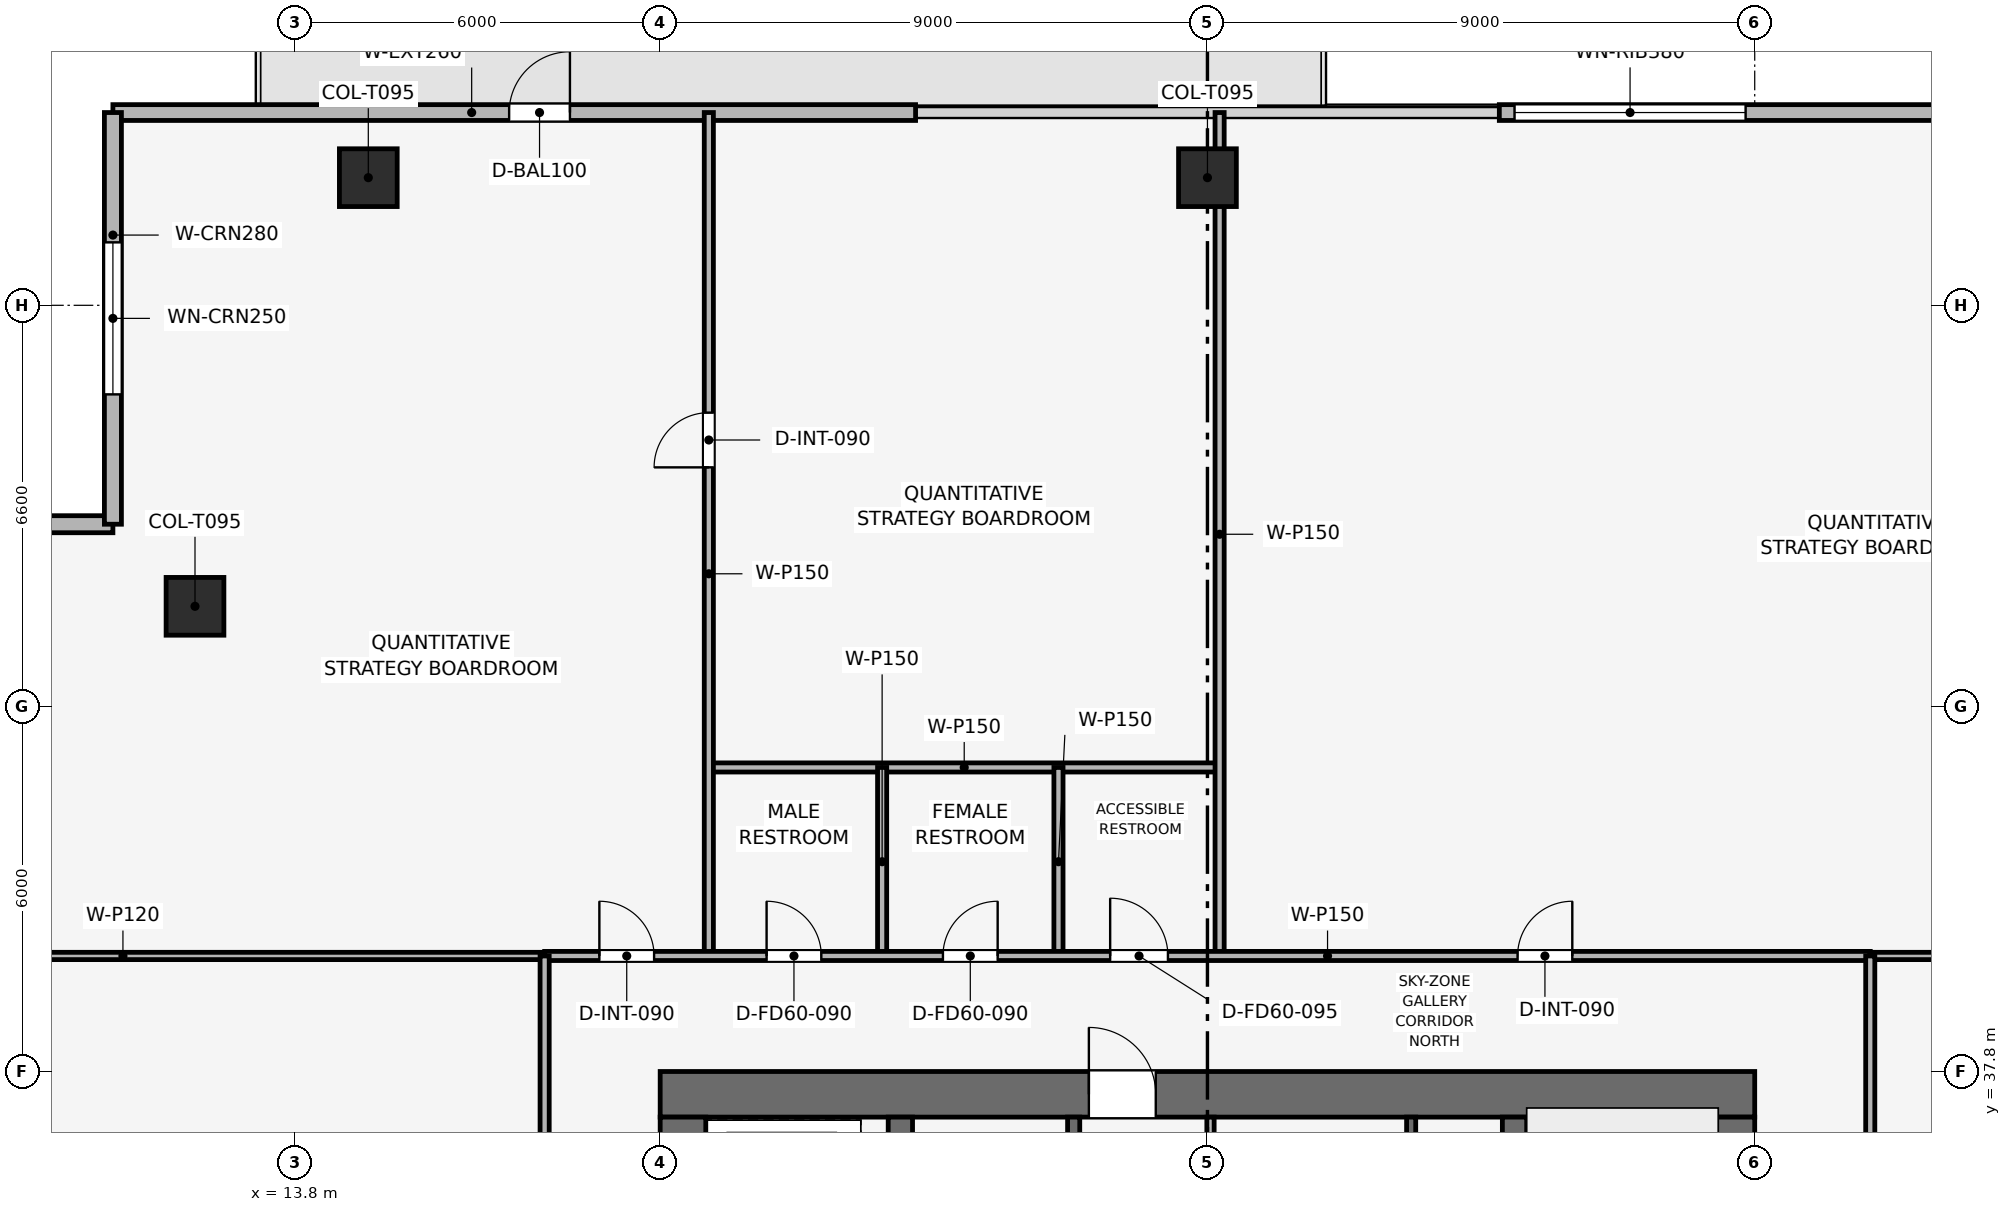
"""IFC4 building model, lengths in metres.
Left out: names, types, materials, properties, quantities, classifications, styles, units other than length and angle.
Written with IfcOpenShell. Run it as: python <this file> out.ifc"""

import sys

from ifc_helpers import new_model, si_unit, direction, frame, frame_2d, origin, origin_2d, place, context, subcontext, project, spatial, rectangle, extrude, element, fill, save


model = new_model("IFC4")
c1 = context("Model", 3, precision=1e-05, world=origin(), true_north=direction((0.0, 1.0)))
c2 = subcontext(c1, "Body", "Model", "MODEL_VIEW")
j1 = project(units=[si_unit("LENGTHUNIT", "METRE"), si_unit("PLANEANGLEUNIT", "RADIAN")], contexts=[c1])
p1 = place(None, origin())
s1 = spatial("IfcSite", under=j1, at=p1, CompositionType="ELEMENT")
p2 = place(p1, origin())
s2 = spatial("IfcBuilding", under=s1, at=p2, CompositionType="ELEMENT")
p3 = place(p2, frame((0.0, 0.0, 280.35)))
s3 = spatial("IfcBuildingStorey", under=s2, at=p3, CompositionType="ELEMENT", Elevation=280.35)
p4 = place(p3, frame((19.8, 37.425, 0.0), z_axis=(0.0, 0.0, 1.0), x_axis=(1.0, 0.0, 0.0)))
e1 = element("IfcWall", 1, at=p4, inside=s3, PredefinedType="SHEAR", context=c2, shape_type="SweptSolid", body=[
    extrude(rectangle(XDim=18.0, YDim=0.75, at=frame_2d((9.0, 0.0))), origin(), (0.0, 0.0, 1.0), 3.75),
])
p5 = place(p4, frame((7.05, 0.0, 0.0)))
e2 = element("IfcOpeningElement", 2, at=p5, cuts=e1, PredefinedType="OPENING", context=c2, shape_type="SweptSolid", body=[
    extrude(rectangle(XDim=1.1, YDim=2.15, at=frame_2d((0.55, 1.075))), frame((0.0, 0.385, 0.0), z_axis=(0.0, -1.0, 0.0), x_axis=(1.0, 0.0, 0.0)), (0.0, 0.0, 1.0), 0.77),
])
p6 = place(p3, frame((20.175, 20.55, 0.0), z_axis=(0.0, 0.0, 1.0), x_axis=(0.0, 1.0, 0.0)))
e3 = element("IfcWall", 3, at=p6, inside=s3, PredefinedType="SHEAR", context=c2, shape_type="SweptSolid", body=[
    extrude(rectangle(XDim=16.5, YDim=0.75, at=frame_2d((8.25, 0.0))), origin(), (0.0, 0.0, 1.0), 3.75),
])
p7 = place(p6, frame((10.25, 0.0, 0.0)))
e4 = element("IfcOpeningElement", 4, at=p7, cuts=e3, PredefinedType="OPENING", context=c2, shape_type="SweptSolid", body=[
    extrude(rectangle(XDim=1.1, YDim=2.15, at=frame_2d((0.55, 1.075))), frame((0.0, 0.385, 0.0), z_axis=(0.0, -1.0, 0.0), x_axis=(1.0, 0.0, 0.0)), (0.0, 0.0, 1.0), 0.77),
])
p8 = place(p3, frame((37.425, 20.55, 0.0), z_axis=(0.0, 0.0, 1.0), x_axis=(0.0, 1.0, 0.0)))
e5 = element("IfcWall", 5, at=p8, inside=s3, PredefinedType="SHEAR", context=c2, shape_type="SweptSolid", body=[
    extrude(rectangle(XDim=16.5, YDim=0.75, at=frame_2d((8.25, 0.0))), origin(), (0.0, 0.0, 1.0), 3.75),
])
p9 = place(p8, frame((4.75, 0.0, 0.0)))
e6 = element("IfcOpeningElement", 6, at=p9, cuts=e5, PredefinedType="OPENING", context=c2, shape_type="SweptSolid", body=[
    extrude(rectangle(XDim=1.1, YDim=2.15, at=frame_2d((0.55, 1.075))), frame((0.0, 0.385, 0.0), z_axis=(0.0, -1.0, 0.0), x_axis=(1.0, 0.0, 0.0)), (0.0, 0.0, 1.0), 0.77),
])
for number, where, z_axis, x_axis in (
    (7, (23.75, 20.55, 0.0), (0.0, 0.0, 1.0), (0.0, 1.0, 0.0)),
    (8, (33.85, 20.55, 0.0), (0.0, 0.0, 1.0), (0.0, 1.0, 0.0)),
):
    element("IfcWall", number, at=place(p3, frame(where, z_axis=z_axis, x_axis=x_axis)), inside=s3, PredefinedType="SHEAR", context=c2, shape_type="SweptSolid", body=[
        extrude(rectangle(XDim=16.5, YDim=0.4, at=frame_2d((8.25, 0.0))), origin(), (0.0, 0.0, 1.0), 3.75),
    ])
for number, where, z_axis, x_axis in (
    (9, (28.8, 52.499, 0.003), (0.0, -0.233, 0.972), (1.0, 0.0, 0.0)),
    (10, (15.0, 52.499, 0.003), (0.0, -0.233, 0.972), (1.0, 0.0, 0.0)),
):
    element("IfcColumn", number, at=place(p3, frame(where, z_axis=z_axis, x_axis=x_axis)), inside=s3, PredefinedType="COLUMN", context=c2, shape_type="SweptSolid", body=[
        extrude(rectangle(XDim=0.95, YDim=0.95, at=origin_2d()), origin(), (0.0, 0.0, 1.0), 3.48),
    ])
p10 = place(p3, frame((12.15, 45.45, 0.003), z_axis=(0.156204794595, -0.156204794595, 0.975294890939), x_axis=(0.707106781187, 0.707106781187, 0.0)))
e11 = element("IfcColumn", 11, at=p10, inside=s3, PredefinedType="COLUMN", context=c2, shape_type="SweptSolid", body=[
    extrude(rectangle(XDim=0.95, YDim=0.95, at=origin_2d()), origin(), (0.0, 0.0, 1.0), 3.47),
])
p11 = place(p3, frame((10.8, 53.57, 0.0), z_axis=(0.0, 0.0, 1.0), x_axis=(1.0, 0.0, 0.0)))
e12 = element("IfcWall", 12, at=p11, inside=s3, PredefinedType="SOLIDWALL", context=c2, shape_type="SweptSolid", body=[
    extrude(rectangle(XDim=13.2, YDim=0.26, at=frame_2d((6.6, 0.0))), origin(), (0.0, 0.0, 1.0), 3.39),
])
p12 = place(p11, frame((6.516, 0.0, 0.0)))
e13 = element("IfcOpeningElement", 13, at=p12, cuts=e12, PredefinedType="OPENING", context=c2, shape_type="SweptSolid", body=[
    extrude(rectangle(XDim=1.0, YDim=2.2, at=frame_2d((0.5, 1.1))), frame((0.0, 0.14, 0.0), z_axis=(0.0, -1.0, 0.0), x_axis=(1.0, 0.0, 0.0)), (0.0, 0.0, 1.0), 0.28),
])
p13 = place(p3, frame((33.6, 53.57, 0.0), z_axis=(0.0, 0.0, 1.0), x_axis=(1.0, 0.0, 0.0)))
e14 = element("IfcWall", 14, at=p13, inside=s3, PredefinedType="SOLIDWALL", context=c2, shape_type="SweptSolid", body=[
    extrude(rectangle(XDim=13.2, YDim=0.26, at=frame_2d((6.6, 0.0))), origin(), (0.0, 0.0, 1.0), 3.39),
])
p14 = place(p13, frame((0.25, 0.0, 0.72)))
e15 = element("IfcOpeningElement", 15, at=p14, cuts=e14, PredefinedType="OPENING", context=c2, shape_type="SweptSolid", body=[
    extrude(rectangle(XDim=3.8, YDim=1.9, at=frame_2d((1.9, 0.95))), frame((0.0, 0.14, 0.0), z_axis=(0.0, -1.0, 0.0), x_axis=(1.0, 0.0, 0.0)), (0.0, 0.0, 1.0), 0.28),
])
p15 = place(p3, frame((4.03, 46.8, 0.0), z_axis=(0.0, 0.0, 1.0), x_axis=(1.0, 0.0, 0.0)))
e16 = element("IfcWall", 16, at=p15, inside=s3, PredefinedType="SOLIDWALL", context=c2, shape_type="SweptSolid", body=[
    extrude(rectangle(XDim=6.77, YDim=0.28, at=frame_2d((3.385, 0.0))), origin(), (0.0, 0.0, 1.0), 3.39),
])
p16 = place(p15, frame((2.135, 0.0, 0.72)))
e17 = element("IfcOpeningElement", 17, at=p16, cuts=e16, PredefinedType="OPENING", context=c2, shape_type="SweptSolid", body=[
    extrude(rectangle(XDim=2.5, YDim=1.9, at=frame_2d((1.25, 0.95))), frame((0.0, 0.15, 0.0), z_axis=(0.0, -1.0, 0.0), x_axis=(1.0, 0.0, 0.0)), (0.0, 0.0, 1.0), 0.3),
])
p17 = place(p3, frame((10.8, 46.8, 0.0), z_axis=(0.0, 0.0, 1.0), x_axis=(0.0, 1.0, 0.0)))
e18 = element("IfcWall", 18, at=p17, inside=s3, PredefinedType="SOLIDWALL", context=c2, shape_type="SweptSolid", body=[
    extrude(rectangle(XDim=6.77, YDim=0.28, at=frame_2d((3.385, 0.0))), origin(), (0.0, 0.0, 1.0), 3.39),
])
p18 = place(p17, frame((2.135, 0.0, 0.72)))
e19 = element("IfcOpeningElement", 19, at=p18, cuts=e18, PredefinedType="OPENING", context=c2, shape_type="SweptSolid", body=[
    extrude(rectangle(XDim=2.5, YDim=1.9, at=frame_2d((1.25, 0.95))), frame((0.0, 0.15, 0.0), z_axis=(0.0, -1.0, 0.0), x_axis=(1.0, 0.0, 0.0)), (0.0, 0.0, 1.0), 0.3),
])
p19 = place(p3, frame((32.15, 34.0, 0.0), z_axis=(0.0, 0.0, 1.0), x_axis=(0.0, 1.0, 0.0)))
e20 = element("IfcWall", 20, at=p19, inside=s3, PredefinedType="SHEAR", context=c2, shape_type="SweptSolid", body=[
    extrude(rectangle(XDim=3.05, YDim=0.15, at=frame_2d((1.525, 0.0))), origin(), (0.0, 0.0, 1.0), 3.39),
])
p20 = place(p3, frame((26.6, 34.0, 0.0), z_axis=(0.0, 0.0, 1.0), x_axis=(0.0, 1.0, 0.0)))
e21 = element("IfcWall", 21, at=p20, inside=s3, PredefinedType="SHEAR", context=c2, shape_type="SweptSolid", body=[
    extrude(rectangle(XDim=3.05, YDim=0.2, at=frame_2d((1.525, 0.0))), origin(), (0.0, 0.0, 1.0), 3.39),
])
p21 = place(p20, frame((0.75, 0.0, 0.0)))
e22 = element("IfcOpeningElement", 22, at=p21, cuts=e21, PredefinedType="OPENING", context=c2, shape_type="SweptSolid", body=[
    extrude(rectangle(XDim=1.1, YDim=2.15, at=frame_2d((0.55, 1.075))), frame((0.0, 0.11, 0.0), z_axis=(0.0, -1.0, 0.0), x_axis=(1.0, 0.0, 0.0)), (0.0, 0.0, 1.0), 0.22),
])
p22 = place(p3, frame((28.85, 33.925, 0.0), z_axis=(0.0, 0.0, 1.0), x_axis=(0.0, 1.0, 0.0)))
e23 = element("IfcWall", 23, at=p22, inside=s3, PredefinedType="PARTITIONING", context=c2, shape_type="SweptSolid", body=[
    extrude(rectangle(XDim=3.125, YDim=0.12, at=frame_2d((1.562, 0.0))), origin(), (0.0, 0.0, 1.0), 3.39),
])
p23 = place(p22, frame((0.25, 0.0, 0.0)))
e24 = element("IfcOpeningElement", 24, at=p23, cuts=e23, PredefinedType="OPENING", context=c2, shape_type="SweptSolid", body=[
    extrude(rectangle(XDim=0.85, YDim=2.1, at=frame_2d((0.425, 1.05))), frame((0.0, 0.07, 0.0), z_axis=(0.0, -1.0, 0.0), x_axis=(1.0, 0.0, 0.0)), (0.0, 0.0, 1.0), 0.14),
])
p24 = place(p22, frame((1.72, 0.0, 0.0)))
e25 = element("IfcOpeningElement", 25, at=p24, cuts=e23, PredefinedType="OPENING", context=c2, shape_type="SweptSolid", body=[
    extrude(rectangle(XDim=0.85, YDim=2.1, at=frame_2d((0.425, 1.05))), frame((0.0, 0.07, 0.0), z_axis=(0.0, -1.0, 0.0), x_axis=(1.0, 0.0, 0.0)), (0.0, 0.0, 1.0), 0.14),
])
p25 = place(p3, frame((20.6, 42.8, 0.0), z_axis=(0.0, 0.0, 1.0), x_axis=(1.0, 0.0, 0.0)))
e26 = element("IfcWall", 26, at=p25, inside=s3, PredefinedType="PARTITIONING", context=c2, shape_type="SweptSolid", body=[
    extrude(rectangle(XDim=8.4, YDim=0.15, at=frame_2d((4.2, 0.0))), origin(), (0.0, 0.0, 1.0), 2.975),
])
p26 = place(p3, frame((20.6, 39.7, 0.0), z_axis=(0.0, 0.0, 1.0), x_axis=(0.0, 1.0, 0.0)))
e27 = element("IfcWall", 27, at=p26, inside=s3, PredefinedType="PARTITIONING", context=c2, shape_type="SweptSolid", body=[
    extrude(rectangle(XDim=13.87, YDim=0.15, at=frame_2d((6.935, 0.0))), origin(), (0.0, 0.0, 1.0), 2.975),
])
p27 = place(p26, frame((8.035, 0.0, 0.0)))
e28 = element("IfcOpeningElement", 28, at=p27, cuts=e27, PredefinedType="OPENING", context=c2, shape_type="SweptSolid", body=[
    extrude(rectangle(XDim=0.9, YDim=2.1, at=frame_2d((0.45, 1.05))), frame((0.0, 0.085, 0.0), z_axis=(0.0, -1.0, 0.0), x_axis=(1.0, 0.0, 0.0)), (0.0, 0.0, 1.0), 0.17),
])
p28 = place(p3, frame((29.0, 39.7, 0.0), z_axis=(0.0, 0.0, 1.0), x_axis=(0.0, 1.0, 0.0)))
e29 = element("IfcWall", 29, at=p28, inside=s3, PredefinedType="PARTITIONING", context=c2, shape_type="SweptSolid", body=[
    extrude(rectangle(XDim=13.87, YDim=0.15, at=frame_2d((6.935, 0.0))), origin(), (0.0, 0.0, 1.0), 2.975),
])
for number, where, z_axis, x_axis in (
    (30, (23.45, 39.7, 0.0), (0.0, 0.0, 1.0), (0.0, 1.0, 0.0)),
    (31, (26.35, 39.7, 0.0), (0.0, 0.0, 1.0), (0.0, 1.0, 0.0)),
):
    element("IfcWall", number, at=place(p3, frame(where, z_axis=z_axis, x_axis=x_axis)), inside=s3, PredefinedType="PARTITIONING", context=c2, shape_type="SweptSolid", body=[
        extrude(rectangle(XDim=3.1, YDim=0.15, at=frame_2d((1.55, 0.0))), origin(), (0.0, 0.0, 1.0), 3.015),
    ])
p29 = place(p3, frame((4.03, 39.7, 0.0), z_axis=(0.0, 0.0, 1.0), x_axis=(1.0, 0.0, 0.0)))
e32 = element("IfcWall", 32, at=p29, inside=s3, PredefinedType="PARTITIONING", context=c2, shape_type="SweptSolid", body=[
    extrude(rectangle(XDim=13.87, YDim=0.12, at=frame_2d((6.935, 0.0))), origin(), (0.0, 0.0, 1.0), 2.975),
])
p30 = place(p3, frame((39.7, 39.7, 0.0), z_axis=(0.0, 0.0, 1.0), x_axis=(1.0, 0.0, 0.0)))
e33 = element("IfcWall", 33, at=p30, inside=s3, PredefinedType="PARTITIONING", context=c2, shape_type="SweptSolid", body=[
    extrude(rectangle(XDim=13.87, YDim=0.12, at=frame_2d((6.935, 0.0))), origin(), (0.0, 0.0, 1.0), 2.975),
])
p31 = place(p3, frame((17.9, 39.7, 0.0), z_axis=(0.0, 0.0, 1.0), x_axis=(1.0, 0.0, 0.0)))
e34 = element("IfcWall", 34, at=p31, inside=s3, PredefinedType="PARTITIONING", context=c2, shape_type="SweptSolid", body=[
    extrude(rectangle(XDim=21.8, YDim=0.15, at=frame_2d((10.9, 0.0))), origin(), (0.0, 0.0, 1.0), 2.975),
])
p32 = place(p31, frame((0.9, 0.0, 0.0)))
e35 = element("IfcOpeningElement", 35, at=p32, cuts=e34, PredefinedType="OPENING", context=c2, shape_type="SweptSolid", body=[
    extrude(rectangle(XDim=0.9, YDim=2.1, at=frame_2d((0.45, 1.05))), frame((0.0, 0.085, 0.0), z_axis=(0.0, -1.0, 0.0), x_axis=(1.0, 0.0, 0.0)), (0.0, 0.0, 1.0), 0.17),
])
p33 = place(p31, frame((3.65, 0.0, 0.0)))
e36 = element("IfcOpeningElement", 36, at=p33, cuts=e34, PredefinedType="OPENING", context=c2, shape_type="SweptSolid", body=[
    extrude(rectangle(XDim=0.9, YDim=2.1, at=frame_2d((0.45, 1.05))), frame((0.0, 0.085, 0.0), z_axis=(0.0, -1.0, 0.0), x_axis=(1.0, 0.0, 0.0)), (0.0, 0.0, 1.0), 0.17),
])
p34 = place(p31, frame((6.55, 0.0, 0.0)))
e37 = element("IfcOpeningElement", 37, at=p34, cuts=e34, PredefinedType="OPENING", context=c2, shape_type="SweptSolid", body=[
    extrude(rectangle(XDim=0.9, YDim=2.1, at=frame_2d((0.45, 1.05))), frame((0.0, 0.085, 0.0), z_axis=(0.0, -1.0, 0.0), x_axis=(1.0, 0.0, 0.0)), (0.0, 0.0, 1.0), 0.17),
])
p35 = place(p31, frame((9.3, 0.0, 0.0)))
e38 = element("IfcOpeningElement", 38, at=p35, cuts=e34, PredefinedType="OPENING", context=c2, shape_type="SweptSolid", body=[
    extrude(rectangle(XDim=0.95, YDim=2.1, at=frame_2d((0.475, 1.05))), frame((0.0, 0.085, 0.0), z_axis=(0.0, -1.0, 0.0), x_axis=(1.0, 0.0, 0.0)), (0.0, 0.0, 1.0), 0.17),
])
p36 = place(p31, frame((16.0, 0.0, 0.0)))
e39 = element("IfcOpeningElement", 39, at=p36, cuts=e34, PredefinedType="OPENING", context=c2, shape_type="SweptSolid", body=[
    extrude(rectangle(XDim=0.9, YDim=2.1, at=frame_2d((0.45, 1.05))), frame((0.0, 0.085, 0.0), z_axis=(0.0, -1.0, 0.0), x_axis=(1.0, 0.0, 0.0)), (0.0, 0.0, 1.0), 0.17),
])
p37 = place(p3, frame((17.9, 10.8, 0.0), z_axis=(0.0, 0.0, 1.0), x_axis=(0.0, 1.0, 0.0)))
e40 = element("IfcWall", 40, at=p37, inside=s3, PredefinedType="PARTITIONING", context=c2, shape_type="SweptSolid", body=[
    extrude(rectangle(XDim=28.9, YDim=0.15, at=frame_2d((14.45, 0.0))), origin(), (0.0, 0.0, 1.0), 2.975),
])
p38 = place(p37, frame((14.0, 0.0, 0.0)))
e41 = element("IfcOpeningElement", 41, at=p38, cuts=e40, PredefinedType="OPENING", context=c2, shape_type="SweptSolid", body=[
    extrude(rectangle(XDim=0.9, YDim=2.1, at=frame_2d((0.45, 1.05))), frame((0.0, 0.085, 0.0), z_axis=(0.0, -1.0, 0.0), x_axis=(1.0, 0.0, 0.0)), (0.0, 0.0, 1.0), 0.17),
])
p39 = place(p3, frame((39.7, 24.4, 0.0), z_axis=(0.0, 0.0, 1.0), x_axis=(0.0, 1.0, 0.0)))
e42 = element("IfcWall", 42, at=p39, inside=s3, PredefinedType="PARTITIONING", context=c2, shape_type="SweptSolid", body=[
    extrude(rectangle(XDim=15.3, YDim=0.15, at=frame_2d((7.65, 0.0))), origin(), (0.0, 0.0, 1.0), 2.975),
])
p40 = place(p39, frame((0.7, 0.0, 0.0)))
e43 = element("IfcOpeningElement", 43, at=p40, cuts=e42, PredefinedType="OPENING", context=c2, shape_type="SweptSolid", body=[
    extrude(rectangle(XDim=0.9, YDim=2.1, at=frame_2d((0.45, 1.05))), frame((0.0, 0.085, 0.0), z_axis=(0.0, -1.0, 0.0), x_axis=(1.0, 0.0, 0.0)), (0.0, 0.0, 1.0), 0.17),
])
p41 = place(p39, frame((4.141, 0.0, 0.0)))
e44 = element("IfcOpeningElement", 44, at=p41, cuts=e42, PredefinedType="OPENING", context=c2, shape_type="SweptSolid", body=[
    extrude(rectangle(XDim=0.9, YDim=2.1, at=frame_2d((0.45, 1.05))), frame((0.0, 0.085, 0.0), z_axis=(0.0, -1.0, 0.0), x_axis=(1.0, 0.0, 0.0)), (0.0, 0.0, 1.0), 0.17),
])
p42 = place(p39, frame((10.641, 0.0, 0.0)))
e45 = element("IfcOpeningElement", 45, at=p42, cuts=e42, PredefinedType="OPENING", context=c2, shape_type="SweptSolid", body=[
    extrude(rectangle(XDim=0.9, YDim=2.1, at=frame_2d((0.45, 1.05))), frame((0.0, 0.085, 0.0), z_axis=(0.0, -1.0, 0.0), x_axis=(1.0, 0.0, 0.0)), (0.0, 0.0, 1.0), 0.17),
])
p43 = place(p12, origin())
e46 = element("IfcDoor", 46, at=p43, inside=s3, OperationType="SINGLE_SWING_RIGHT", PredefinedType="DOOR", context=c2, shape_type="SweptSolid", body=[
    extrude(rectangle(XDim=1.0, YDim=2.2, at=frame_2d((0.5, 1.1))), frame((0.0, 0.025, 0.0), z_axis=(0.0, -1.0, 0.0), x_axis=(1.0, 0.0, 0.0)), (0.0, 0.0, 1.0), 0.05),
])
fill(e13, e46)
p44 = place(p14, origin())
e47 = element("IfcWindow", 47, at=p44, inside=s3, PartitioningType="SINGLE_PANEL", PredefinedType="WINDOW", context=c2, shape_type="SweptSolid", body=[
    extrude(rectangle(XDim=3.8, YDim=1.9, at=frame_2d((1.9, 0.95))), frame((0.0, 0.03, 0.0), z_axis=(0.0, -1.0, 0.0), x_axis=(1.0, 0.0, 0.0)), (0.0, 0.0, 1.0), 0.06),
])
fill(e15, e47)
p45 = place(p18, origin())
e48 = element("IfcWindow", 48, at=p45, inside=s3, PartitioningType="SINGLE_PANEL", PredefinedType="WINDOW", context=c2, shape_type="SweptSolid", body=[
    extrude(rectangle(XDim=2.5, YDim=1.9, at=frame_2d((1.25, 0.95))), frame((0.0, 0.03, 0.0), z_axis=(0.0, -1.0, 0.0), x_axis=(1.0, 0.0, 0.0)), (0.0, 0.0, 1.0), 0.06),
])
fill(e19, e48)
p46 = place(p27, origin())
e49 = element("IfcDoor", 49, at=p46, inside=s3, OperationType="SINGLE_SWING_LEFT", PredefinedType="DOOR", context=c2, shape_type="SweptSolid", body=[
    extrude(rectangle(XDim=0.9, YDim=2.1, at=frame_2d((0.45, 1.05))), frame((0.0, 0.025, 0.0), z_axis=(0.0, -1.0, 0.0), x_axis=(1.0, 0.0, 0.0)), (0.0, 0.0, 1.0), 0.05),
])
fill(e28, e49)
p47 = place(p32, origin())
e50 = element("IfcDoor", 50, at=p47, inside=s3, OperationType="SINGLE_SWING_LEFT", PredefinedType="DOOR", context=c2, shape_type="SweptSolid", body=[
    extrude(rectangle(XDim=0.9, YDim=2.1, at=frame_2d((0.45, 1.05))), frame((0.0, 0.025, 0.0), z_axis=(0.0, -1.0, 0.0), x_axis=(1.0, 0.0, 0.0)), (0.0, 0.0, 1.0), 0.05),
])
fill(e35, e50)
p48 = place(p33, origin())
e51 = element("IfcDoor", 51, at=p48, inside=s3, OperationType="SINGLE_SWING_LEFT", PredefinedType="DOOR", context=c2, shape_type="SweptSolid", body=[
    extrude(rectangle(XDim=0.9, YDim=2.1, at=frame_2d((0.45, 1.05))), frame((0.0, 0.025, 0.0), z_axis=(0.0, -1.0, 0.0), x_axis=(1.0, 0.0, 0.0)), (0.0, 0.0, 1.0), 0.05),
])
fill(e36, e51)
p49 = place(p34, origin())
e52 = element("IfcDoor", 52, at=p49, inside=s3, OperationType="SINGLE_SWING_RIGHT", PredefinedType="DOOR", context=c2, shape_type="SweptSolid", body=[
    extrude(rectangle(XDim=0.9, YDim=2.1, at=frame_2d((0.45, 1.05))), frame((0.0, 0.025, 0.0), z_axis=(0.0, -1.0, 0.0), x_axis=(1.0, 0.0, 0.0)), (0.0, 0.0, 1.0), 0.05),
])
fill(e37, e52)
p50 = place(p35, origin())
e53 = element("IfcDoor", 53, at=p50, inside=s3, OperationType="SINGLE_SWING_LEFT", PredefinedType="DOOR", context=c2, shape_type="SweptSolid", body=[
    extrude(rectangle(XDim=0.95, YDim=2.1, at=frame_2d((0.475, 1.05))), frame((0.0, 0.025, 0.0), z_axis=(0.0, -1.0, 0.0), x_axis=(1.0, 0.0, 0.0)), (0.0, 0.0, 1.0), 0.05),
])
fill(e38, e53)
p51 = place(p36, origin())
e54 = element("IfcDoor", 54, at=p51, inside=s3, OperationType="SINGLE_SWING_RIGHT", PredefinedType="DOOR", context=c2, shape_type="SweptSolid", body=[
    extrude(rectangle(XDim=0.9, YDim=2.1, at=frame_2d((0.45, 1.05))), frame((0.0, 0.025, 0.0), z_axis=(0.0, -1.0, 0.0), x_axis=(1.0, 0.0, 0.0)), (0.0, 0.0, 1.0), 0.05),
])
fill(e39, e54)
p52 = place(p5, origin())
e55 = element("IfcDoor", 55, at=p52, inside=s3, OperationType="SINGLE_SWING_LEFT", PredefinedType="DOOR", context=c2, shape_type="SweptSolid", body=[
    extrude(rectangle(XDim=1.1, YDim=2.15, at=frame_2d((0.55, 1.075))), frame((0.0, 0.025, 0.0), z_axis=(0.0, -1.0, 0.0), x_axis=(1.0, 0.0, 0.0)), (0.0, 0.0, 1.0), 0.05),
])
fill(e2, e55)
save(model, sys.argv[1])
